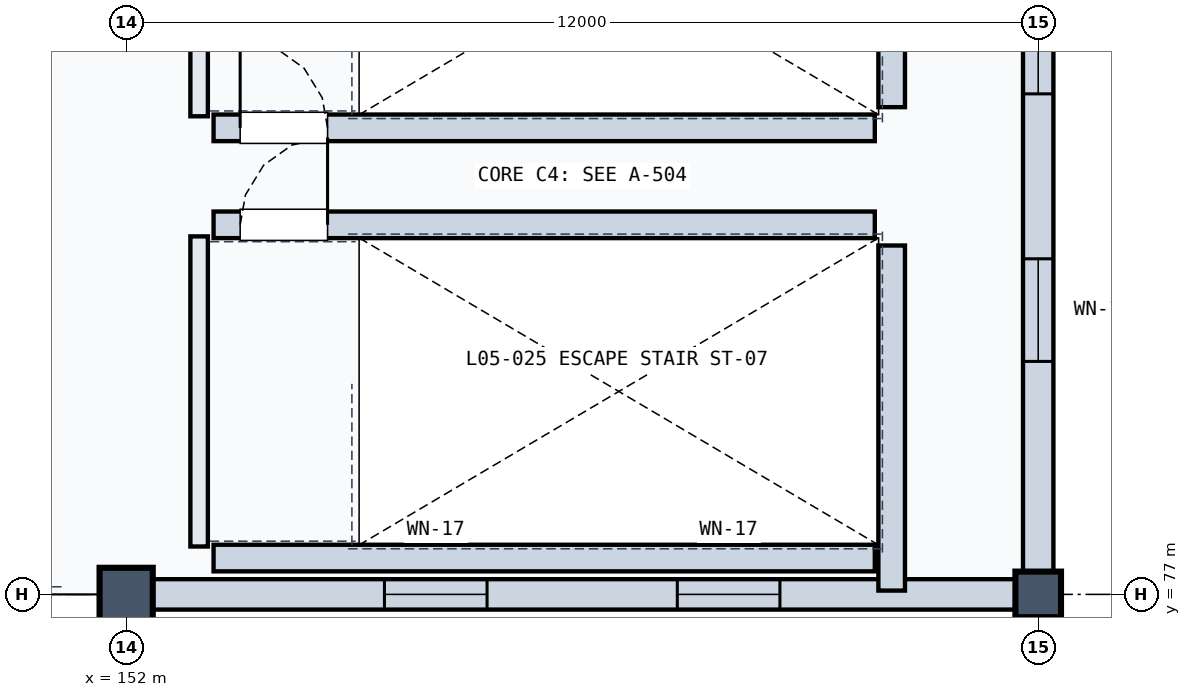
"""IFC4 building model, lengths in metres.
Left out: names, types, materials, properties, quantities, classifications, styles, units other than length and angle.
Written with IfcOpenShell. Run it as: python <this file> out.ifc"""

import sys

from ifc_helpers import new_model, si_unit, direction, frame, frame_2d, origin, origin_2d, place, context, subcontext, project, spatial, rectangle, extrude, element, fill, save


model = new_model("IFC4")
c1 = context("Model", 3, precision=1e-05, world=origin(), true_north=direction((0.0, 1.0)))
c2 = subcontext(c1, "Body", "Model", "MODEL_VIEW")
j1 = project(units=[si_unit("LENGTHUNIT", "METRE"), si_unit("PLANEANGLEUNIT", "RADIAN")], contexts=[c1])
p1 = place(None, origin())
s1 = spatial("IfcSite", under=j1, at=p1, CompositionType="ELEMENT")
p2 = place(p1, origin())
s2 = spatial("IfcBuilding", under=s1, at=p2, CompositionType="ELEMENT")
p3 = place(p2, frame((0.0, 0.0, 24.3)))
s3 = spatial("IfcBuildingStorey", under=s2, at=p3, CompositionType="ELEMENT", Elevation=24.3)
p4 = place(p3, frame((152.0, 77.0, 0.0), z_axis=(0.0, 0.0, 1.0), x_axis=(1.0, 0.0, 0.0)))
e1 = element("IfcColumn", 1, at=p4, inside=s3, PredefinedType="COLUMN", context=c2, shape_type="SweptSolid", body=[
    extrude(rectangle(XDim=0.7, YDim=0.7, at=origin_2d()), origin(), (0.0, 0.0, 1.0), 5.4),
])
p5 = place(p3, frame((164.0, 77.0, 0.0), z_axis=(0.0, 0.0, 1.0), x_axis=(1.0, 0.0, 0.0)))
e2 = element("IfcColumn", 2, at=p5, inside=s3, PredefinedType="COLUMN", context=c2, shape_type="SweptSolid", body=[
    extrude(rectangle(XDim=0.6, YDim=0.6, at=origin_2d()), origin(), (0.0, 0.0, 1.0), 5.4),
])
p6 = place(p3, frame((152.22, 77.0, 0.0), z_axis=(0.0, 0.0, 1.0), x_axis=(1.0, 0.0, 0.0)))
e3 = element("IfcWall", 3, at=p6, inside=s3, PredefinedType="SOLIDWALL", context=c2, shape_type="SweptSolid", body=[
    extrude(rectangle(XDim=11.56, YDim=0.4, at=frame_2d((5.78, 0.0))), origin(), (0.0, 0.0, 1.0), 5.185),
])
p7 = place(p6, frame((3.178, 0.0, 0.8)))
e4 = element("IfcOpeningElement", 4, at=p7, cuts=e3, PredefinedType="OPENING", context=c2, shape_type="SweptSolid", body=[
    extrude(rectangle(XDim=1.35, YDim=2.1, at=frame_2d((0.675, 1.05))), frame((0.0, 0.21, 0.0), z_axis=(0.0, -1.0, 0.0), x_axis=(1.0, 0.0, 0.0)), (0.0, 0.0, 1.0), 0.42),
])
p8 = place(p6, frame((7.032, 0.0, 0.8)))
e5 = element("IfcOpeningElement", 5, at=p8, cuts=e3, PredefinedType="OPENING", context=c2, shape_type="SweptSolid", body=[
    extrude(rectangle(XDim=1.35, YDim=2.1, at=frame_2d((0.675, 1.05))), frame((0.0, 0.21, 0.0), z_axis=(0.0, -1.0, 0.0), x_axis=(1.0, 0.0, 0.0)), (0.0, 0.0, 1.0), 0.42),
])
p9 = place(p3, frame((164.0, 77.22, 0.0), z_axis=(0.0, 0.0, 1.0), x_axis=(0.0, 1.0, 0.0)))
e6 = element("IfcWall", 6, at=p9, inside=s3, PredefinedType="SOLIDWALL", context=c2, shape_type="SweptSolid", body=[
    extrude(rectangle(XDim=10.56, YDim=0.4, at=frame_2d((5.28, 0.0))), origin(), (0.0, 0.0, 1.0), 5.185),
])
p10 = place(p9, frame((2.845, 0.0, 0.8)))
e7 = element("IfcOpeningElement", 7, at=p10, cuts=e6, PredefinedType="OPENING", context=c2, shape_type="SweptSolid", body=[
    extrude(rectangle(XDim=1.35, YDim=2.1, at=frame_2d((0.675, 1.05))), frame((0.0, 0.21, 0.0), z_axis=(0.0, -1.0, 0.0), x_axis=(1.0, 0.0, 0.0)), (0.0, 0.0, 1.0), 0.42),
])
p11 = place(p9, frame((6.365, 0.0, 0.8)))
e8 = element("IfcOpeningElement", 8, at=p11, cuts=e6, PredefinedType="OPENING", context=c2, shape_type="SweptSolid", body=[
    extrude(rectangle(XDim=1.35, YDim=2.1, at=frame_2d((0.675, 1.05))), frame((0.0, 0.21, 0.0), z_axis=(0.0, -1.0, 0.0), x_axis=(1.0, 0.0, 0.0)), (0.0, 0.0, 1.0), 0.42),
])
p12 = place(p3, frame((152.96, 77.63, 0.0), z_axis=(0.0, 0.0, 1.0), x_axis=(0.0, 1.0, 0.0)))
e9 = element("IfcWall", 9, at=p12, inside=s3, PredefinedType="SOLIDWALL", context=c2, shape_type="SweptSolid", body=[
    extrude(rectangle(XDim=4.08, YDim=0.23, at=frame_2d((2.04, 0.0))), origin(), (0.0, 0.0, 1.0), 5.18),
])
p13 = place(p3, frame((162.072, 77.05, 0.0), z_axis=(0.0, 0.0, 1.0), x_axis=(0.0, 1.0, 0.0)))
e10 = element("IfcWall", 10, at=p13, inside=s3, PredefinedType="SOLIDWALL", context=c2, shape_type="SweptSolid", body=[
    extrude(rectangle(XDim=4.54, YDim=0.35, at=frame_2d((2.27, 0.0))), origin(), (0.0, 0.0, 1.0), 5.18),
])
p14 = place(p3, frame((153.15, 77.478, 0.0), z_axis=(0.0, 0.0, 1.0), x_axis=(1.0, 0.0, 0.0)))
e11 = element("IfcWall", 11, at=p14, inside=s3, PredefinedType="SOLIDWALL", context=c2, shape_type="SweptSolid", body=[
    extrude(rectangle(XDim=8.7, YDim=0.35, at=frame_2d((4.35, 0.0))), origin(), (0.0, 0.0, 1.0), 5.18),
])
p15 = place(p3, frame((153.15, 81.862, 0.0), z_axis=(0.0, 0.0, 1.0), x_axis=(1.0, 0.0, 0.0)))
e12 = element("IfcWall", 12, at=p15, inside=s3, PredefinedType="SOLIDWALL", context=c2, shape_type="SweptSolid", body=[
    extrude(rectangle(XDim=8.7, YDim=0.35, at=frame_2d((4.35, 0.0))), origin(), (0.0, 0.0, 1.0), 5.18),
])
p16 = place(p15, frame((0.35, 0.0, 0.0)))
e13 = element("IfcOpeningElement", 13, at=p16, cuts=e12, PredefinedType="OPENING", context=c2, shape_type="SweptSolid", body=[
    extrude(rectangle(XDim=1.15, YDim=2.2, at=frame_2d((0.575, 1.1))), frame((0.0, 0.185, 0.0), z_axis=(0.0, -1.0, 0.0), x_axis=(1.0, 0.0, 0.0)), (0.0, 0.0, 1.0), 0.37),
])
p17 = place(p3, frame((152.96, 83.29, 0.0), z_axis=(0.0, 0.0, 1.0), x_axis=(0.0, 1.0, 0.0)))
e14 = element("IfcWall", 14, at=p17, inside=s3, PredefinedType="SOLIDWALL", context=c2, shape_type="SweptSolid", body=[
    extrude(rectangle(XDim=4.08, YDim=0.23, at=frame_2d((2.04, 0.0))), origin(), (0.0, 0.0, 1.0), 5.18),
])
p18 = place(p3, frame((162.072, 83.41, 0.0), z_axis=(0.0, 0.0, 1.0), x_axis=(0.0, 1.0, 0.0)))
e15 = element("IfcWall", 15, at=p18, inside=s3, PredefinedType="SOLIDWALL", context=c2, shape_type="SweptSolid", body=[
    extrude(rectangle(XDim=3.84, YDim=0.35, at=frame_2d((1.92, 0.0))), origin(), (0.0, 0.0, 1.0), 5.18),
])
p19 = place(p3, frame((153.15, 83.138, 0.0), z_axis=(0.0, 0.0, 1.0), x_axis=(1.0, 0.0, 0.0)))
e16 = element("IfcWall", 16, at=p19, inside=s3, PredefinedType="SOLIDWALL", context=c2, shape_type="SweptSolid", body=[
    extrude(rectangle(XDim=8.7, YDim=0.35, at=frame_2d((4.35, 0.0))), origin(), (0.0, 0.0, 1.0), 5.18),
])
p20 = place(p19, frame((0.35, 0.0, 0.0)))
e17 = element("IfcOpeningElement", 17, at=p20, cuts=e16, PredefinedType="OPENING", context=c2, shape_type="SweptSolid", body=[
    extrude(rectangle(XDim=1.15, YDim=2.2, at=frame_2d((0.575, 1.1))), frame((0.0, 0.185, 0.0), z_axis=(0.0, -1.0, 0.0), x_axis=(1.0, 0.0, 0.0)), (0.0, 0.0, 1.0), 0.37),
])
p21 = place(p7, origin())
e18 = element("IfcWindow", 18, at=p21, inside=s3, PartitioningType="SINGLE_PANEL", PredefinedType="WINDOW", context=c2, shape_type="SweptSolid", body=[
    extrude(rectangle(XDim=1.35, YDim=2.1, at=frame_2d((0.675, 1.05))), frame((0.0, 0.03, 0.0), z_axis=(0.0, -1.0, 0.0), x_axis=(1.0, 0.0, 0.0)), (0.0, 0.0, 1.0), 0.06),
])
fill(e4, e18)
p22 = place(p8, origin())
e19 = element("IfcWindow", 19, at=p22, inside=s3, PartitioningType="SINGLE_PANEL", PredefinedType="WINDOW", context=c2, shape_type="SweptSolid", body=[
    extrude(rectangle(XDim=1.35, YDim=2.1, at=frame_2d((0.675, 1.05))), frame((0.0, 0.03, 0.0), z_axis=(0.0, -1.0, 0.0), x_axis=(1.0, 0.0, 0.0)), (0.0, 0.0, 1.0), 0.06),
])
fill(e5, e19)
p23 = place(p10, origin())
e20 = element("IfcWindow", 20, at=p23, inside=s3, PartitioningType="SINGLE_PANEL", PredefinedType="WINDOW", context=c2, shape_type="SweptSolid", body=[
    extrude(rectangle(XDim=1.35, YDim=2.1, at=frame_2d((0.675, 1.05))), frame((0.0, 0.03, 0.0), z_axis=(0.0, -1.0, 0.0), x_axis=(1.0, 0.0, 0.0)), (0.0, 0.0, 1.0), 0.06),
])
fill(e7, e20)
p24 = place(p11, origin())
e21 = element("IfcWindow", 21, at=p24, inside=s3, PartitioningType="SINGLE_PANEL", PredefinedType="WINDOW", context=c2, shape_type="SweptSolid", body=[
    extrude(rectangle(XDim=1.35, YDim=2.1, at=frame_2d((0.675, 1.05))), frame((0.0, 0.03, 0.0), z_axis=(0.0, -1.0, 0.0), x_axis=(1.0, 0.0, 0.0)), (0.0, 0.0, 1.0), 0.06),
])
fill(e8, e21)
p25 = place(p16, origin())
e22 = element("IfcDoor", 22, at=p25, inside=s3, OperationType="SINGLE_SWING_RIGHT", PredefinedType="DOOR", context=c2, shape_type="SweptSolid", body=[
    extrude(rectangle(XDim=1.15, YDim=2.2, at=frame_2d((0.575, 1.1))), frame((0.0, 0.025, 0.0), z_axis=(0.0, -1.0, 0.0), x_axis=(1.0, 0.0, 0.0)), (0.0, 0.0, 1.0), 0.05),
])
fill(e13, e22)
p26 = place(p20, origin())
e23 = element("IfcDoor", 23, at=p26, inside=s3, OperationType="SINGLE_SWING_LEFT", PredefinedType="DOOR", context=c2, shape_type="SweptSolid", body=[
    extrude(rectangle(XDim=1.15, YDim=2.2, at=frame_2d((0.575, 1.1))), frame((0.0, 0.025, 0.0), z_axis=(0.0, -1.0, 0.0), x_axis=(1.0, 0.0, 0.0)), (0.0, 0.0, 1.0), 0.05),
])
fill(e17, e23)
save(model, sys.argv[1])
